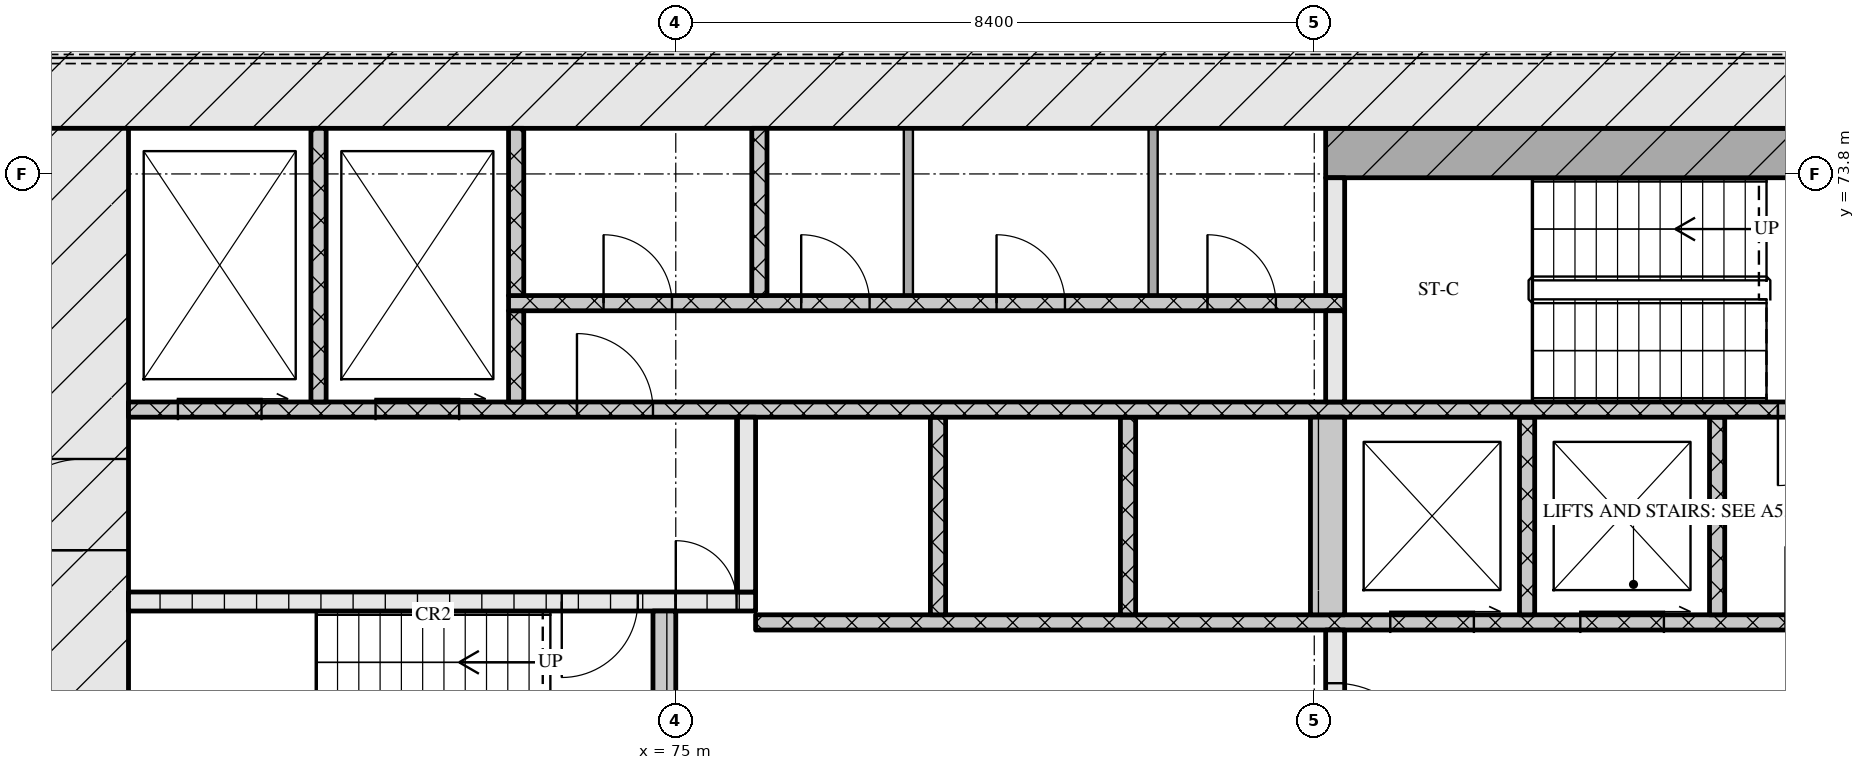
"""IFC4 building model, lengths in metres.
Left out: names, types, materials, properties, quantities, classifications, styles, units other than length and angle.
Written with IfcOpenShell. Run it as: python <this file> out.ifc"""

import sys

from ifc_helpers import new_model, si_unit, direction, frame, frame_2d, origin, place, context, subcontext, project, spatial, rectangle, extrude, element, fill, save


model = new_model("IFC4")
c1 = context("Model", 3, precision=1e-05, world=origin(), true_north=direction((0.0, 1.0)))
c2 = subcontext(c1, "Body", "Model", "MODEL_VIEW")
j1 = project(units=[si_unit("LENGTHUNIT", "METRE"), si_unit("PLANEANGLEUNIT", "RADIAN")], contexts=[c1])
p1 = place(None, origin())
s1 = spatial("IfcSite", under=j1, at=p1, CompositionType="ELEMENT")
p2 = place(p1, origin())
s2 = spatial("IfcBuilding", under=s1, at=p2, CompositionType="ELEMENT")
p3 = place(p2, frame((0.0, 0.0, 23.7)))
s3 = spatial("IfcBuildingStorey", under=s2, at=p3, CompositionType="ELEMENT", Elevation=23.7)
p4 = place(p3, frame((66.6, 75.0, 0.0), z_axis=(0.0, 0.0, 1.0), x_axis=(1.0, 0.0, 0.0)))
e1 = element("IfcWall", 1, at=p4, inside=s3, PredefinedType="SOLIDWALL", context=c2, shape_type="SweptSolid", body=[
    extrude(rectangle(XDim=42.0, YDim=1.2, at=frame_2d((21.0, 0.0))), origin(), (0.0, 0.0, 1.0), 4.2),
])
p5 = place(p3, frame((67.2, 62.4, 0.0), z_axis=(0.0, 0.0, 1.0), x_axis=(0.0, 1.0, 0.0)))
e2 = element("IfcWall", 2, at=p5, inside=s3, PredefinedType="SOLIDWALL", context=c2, shape_type="SweptSolid", body=[
    extrude(rectangle(XDim=12.0, YDim=1.2, at=frame_2d((6.0, 0.0))), origin(), (0.0, 0.0, 1.0), 4.2),
])
p6 = place(p5, frame((6.45, 0.0, 0.0)))
e3 = element("IfcOpeningElement", 3, at=p6, cuts=e2, PredefinedType="OPENING", context=c2, shape_type="SweptSolid", body=[
    extrude(rectangle(XDim=1.2, YDim=2.1, at=frame_2d((0.6, 1.05))), frame((0.0, 0.61, 0.0), z_axis=(0.0, -1.0, 0.0), x_axis=(1.0, 0.0, 0.0)), (0.0, 0.0, 1.0), 1.22),
])
p7 = place(p3, frame((74.85, 65.2, 0.0), z_axis=(0.0, 0.0, 1.0), x_axis=(0.0, 1.0, 0.0)))
e4 = element("IfcWall", 4, at=p7, inside=s3, PredefinedType="SOLIDWALL", context=c2, shape_type="SweptSolid", body=[
    extrude(rectangle(XDim=2.85, YDim=0.3, at=frame_2d((1.425, 0.0))), origin(), (0.0, 0.0, 1.0), 4.2),
])
p8 = place(p3, frame((83.675, 65.2, 0.0), z_axis=(0.0, 0.0, 1.0), x_axis=(0.0, 1.0, 0.0)))
e5 = element("IfcWall", 5, at=p8, inside=s3, PredefinedType="SOLIDWALL", context=c2, shape_type="SweptSolid", body=[
    extrude(rectangle(XDim=2.6, YDim=0.25, at=frame_2d((1.3, 0.0))), origin(), (0.0, 0.0, 1.0), 4.2),
])
p9 = place(p8, frame((0.7, 0.0, 0.0)))
e6 = element("IfcOpeningElement", 6, at=p9, cuts=e5, PredefinedType="OPENING", context=c2, shape_type="SweptSolid", body=[
    extrude(rectangle(XDim=1.2, YDim=2.1, at=frame_2d((0.6, 1.05))), frame((0.0, 0.135, 0.0), z_axis=(0.0, -1.0, 0.0), x_axis=(1.0, 0.0, 0.0)), (0.0, 0.0, 1.0), 0.27),
])
p10 = place(p3, frame((76.05, 67.9, 0.0), z_axis=(0.0, 0.0, 1.0), x_axis=(1.0, 0.0, 0.0)))
e7 = element("IfcWall", 7, at=p10, inside=s3, PredefinedType="SOLIDWALL", context=c2, shape_type="SweptSolid", body=[
    extrude(rectangle(XDim=23.1, YDim=0.2, at=frame_2d((11.55, 0.0))), origin(), (0.0, 0.0, 1.0), 4.2),
])
p11 = place(p10, frame((8.35, 0.0, 0.0)))
e8 = element("IfcOpeningElement", 8, at=p11, cuts=e7, PredefinedType="OPENING", context=c2, shape_type="SweptSolid", body=[
    extrude(rectangle(XDim=1.1, YDim=2.1, at=frame_2d((0.55, 1.05))), frame((0.0, 0.11, 0.0), z_axis=(0.0, -1.0, 0.0), x_axis=(1.0, 0.0, 0.0)), (0.0, 0.0, 1.0), 0.22),
])
p12 = place(p10, frame((10.85, 0.0, 0.0)))
e9 = element("IfcOpeningElement", 9, at=p12, cuts=e7, PredefinedType="OPENING", context=c2, shape_type="SweptSolid", body=[
    extrude(rectangle(XDim=1.1, YDim=2.1, at=frame_2d((0.55, 1.05))), frame((0.0, 0.11, 0.0), z_axis=(0.0, -1.0, 0.0), x_axis=(1.0, 0.0, 0.0)), (0.0, 0.0, 1.0), 0.22),
])
p13 = place(p10, frame((13.55, 0.0, 0.0)))
e10 = element("IfcOpeningElement", 10, at=p13, cuts=e7, PredefinedType="OPENING", context=c2, shape_type="SweptSolid", body=[
    extrude(rectangle(XDim=1.0, YDim=2.1, at=frame_2d((0.5, 1.05))), frame((0.0, 0.11, 0.0), z_axis=(0.0, -1.0, 0.0), x_axis=(1.0, 0.0, 0.0)), (0.0, 0.0, 1.0), 0.22),
])
for number, where, z_axis, x_axis in (
    (11, (78.45, 68.0, 0.0), (0.0, 0.0, 1.0), (0.0, 1.0, 0.0)),
    (12, (80.95, 68.0, 0.0), (0.0, 0.0, 1.0), (0.0, 1.0, 0.0)),
):
    element("IfcWall", number, at=place(p3, frame(where, z_axis=z_axis, x_axis=x_axis)), inside=s3, PredefinedType="SOLIDWALL", context=c2, shape_type="SweptSolid", body=[
        extrude(rectangle(XDim=2.6, YDim=0.2, at=frame_2d((1.3, 0.0))), origin(), (0.0, 0.0, 1.0), 4.2),
    ])
p14 = place(p3, frame((83.575, 68.0, 0.0), z_axis=(0.0, 0.0, 1.0), x_axis=(0.0, 1.0, 0.0)))
e13 = element("IfcWall", 13, at=p14, inside=s3, PredefinedType="SOLIDWALL", context=c2, shape_type="SweptSolid", body=[
    extrude(rectangle(XDim=2.6, YDim=0.45, at=frame_2d((1.3, 0.0))), origin(), (0.0, 0.0, 1.0), 4.2),
])
for number, where, z_axis, x_axis in (
    (14, (86.2, 68.0, 0.0), (0.0, 0.0, 1.0), (0.0, 1.0, 0.0)),
    (15, (88.7, 68.0, 0.0), (0.0, 0.0, 1.0), (0.0, 1.0, 0.0)),
):
    element("IfcWall", number, at=place(p3, frame(where, z_axis=z_axis, x_axis=x_axis)), inside=s3, PredefinedType="SOLIDWALL", context=c2, shape_type="SweptSolid", body=[
        extrude(rectangle(XDim=2.6, YDim=0.2, at=frame_2d((1.3, 0.0))), origin(), (0.0, 0.0, 1.0), 4.2),
    ])
p15 = place(p3, frame((67.8, 68.175, 0.0), z_axis=(0.0, 0.0, 1.0), x_axis=(1.0, 0.0, 0.0)))
e16 = element("IfcWall", 16, at=p15, inside=s3, PredefinedType="SOLIDWALL", context=c2, shape_type="SweptSolid", body=[
    extrude(rectangle(XDim=8.25, YDim=0.25, at=frame_2d((4.125, 0.0))), origin(), (0.0, 0.0, 1.0), 4.2),
])
p16 = place(p15, frame((5.7, 0.0, 0.0)))
e17 = element("IfcOpeningElement", 17, at=p16, cuts=e16, PredefinedType="OPENING", context=c2, shape_type="SweptSolid", body=[
    extrude(rectangle(XDim=1.0, YDim=2.1, at=frame_2d((0.5, 1.05))), frame((0.0, 0.135, 0.0), z_axis=(0.0, -1.0, 0.0), x_axis=(1.0, 0.0, 0.0)), (0.0, 0.0, 1.0), 0.27),
])
p17 = place(p15, frame((7.2, 0.0, 0.0)))
e18 = element("IfcOpeningElement", 18, at=p17, cuts=e16, PredefinedType="OPENING", context=c2, shape_type="SweptSolid", body=[
    extrude(rectangle(XDim=0.8, YDim=2.1, at=frame_2d((0.4, 1.05))), frame((0.0, 0.135, 0.0), z_axis=(0.0, -1.0, 0.0), x_axis=(1.0, 0.0, 0.0)), (0.0, 0.0, 1.0), 0.27),
])
p18 = place(p3, frame((75.925, 68.3, 0.0), z_axis=(0.0, 0.0, 1.0), x_axis=(0.0, 1.0, 0.0)))
e19 = element("IfcWall", 19, at=p18, inside=s3, PredefinedType="SOLIDWALL", context=c2, shape_type="SweptSolid", body=[
    extrude(rectangle(XDim=2.3, YDim=0.25, at=frame_2d((1.15, 0.0))), origin(), (0.0, 0.0, 1.0), 4.2),
])
p19 = place(p3, frame((67.8, 70.7, 0.0), z_axis=(0.0, 0.0, 1.0), x_axis=(1.0, 0.0, 0.0)))
e20 = element("IfcWall", 20, at=p19, inside=s3, PredefinedType="SOLIDWALL", context=c2, shape_type="SweptSolid", body=[
    extrude(rectangle(XDim=39.6, YDim=0.2, at=frame_2d((19.8, 0.0))), origin(), (0.0, 0.0, 1.0), 4.2),
])
p20 = place(p19, frame((0.65, 0.0, 0.0)))
e21 = element("IfcOpeningElement", 21, at=p20, cuts=e20, PredefinedType="OPENING", context=c2, shape_type="SweptSolid", body=[
    extrude(rectangle(XDim=1.1, YDim=2.1, at=frame_2d((0.55, 1.05))), frame((0.0, 0.11, 0.0), z_axis=(0.0, -1.0, 0.0), x_axis=(1.0, 0.0, 0.0)), (0.0, 0.0, 1.0), 0.22),
])
p21 = place(p19, frame((3.25, 0.0, 0.0)))
e22 = element("IfcOpeningElement", 22, at=p21, cuts=e20, PredefinedType="OPENING", context=c2, shape_type="SweptSolid", body=[
    extrude(rectangle(XDim=1.1, YDim=2.1, at=frame_2d((0.55, 1.05))), frame((0.0, 0.11, 0.0), z_axis=(0.0, -1.0, 0.0), x_axis=(1.0, 0.0, 0.0)), (0.0, 0.0, 1.0), 0.22),
])
p22 = place(p19, frame((5.9, 0.0, 0.0)))
e23 = element("IfcOpeningElement", 23, at=p22, cuts=e20, PredefinedType="OPENING", context=c2, shape_type="SweptSolid", body=[
    extrude(rectangle(XDim=1.0, YDim=2.1, at=frame_2d((0.5, 1.05))), frame((0.0, 0.11, 0.0), z_axis=(0.0, -1.0, 0.0), x_axis=(1.0, 0.0, 0.0)), (0.0, 0.0, 1.0), 0.22),
])
p23 = place(p19, frame((21.7, 0.0, 0.0)))
e24 = element("IfcOpeningElement", 24, at=p23, cuts=e20, PredefinedType="OPENING", context=c2, shape_type="SweptSolid", body=[
    extrude(rectangle(XDim=1.0, YDim=2.1, at=frame_2d((0.5, 1.05))), frame((0.0, 0.11, 0.0), z_axis=(0.0, -1.0, 0.0), x_axis=(1.0, 0.0, 0.0)), (0.0, 0.0, 1.0), 0.22),
])
p24 = place(p19, frame((32.7, 0.0, 0.0)))
e25 = element("IfcOpeningElement", 25, at=p24, cuts=e20, PredefinedType="OPENING", context=c2, shape_type="SweptSolid", body=[
    extrude(rectangle(XDim=1.0, YDim=2.1, at=frame_2d((0.5, 1.05))), frame((0.0, 0.11, 0.0), z_axis=(0.0, -1.0, 0.0), x_axis=(1.0, 0.0, 0.0)), (0.0, 0.0, 1.0), 0.22),
])
p25 = place(p19, frame((35.25, 0.0, 0.0)))
e26 = element("IfcOpeningElement", 26, at=p25, cuts=e20, PredefinedType="OPENING", context=c2, shape_type="SweptSolid", body=[
    extrude(rectangle(XDim=1.1, YDim=2.1, at=frame_2d((0.55, 1.05))), frame((0.0, 0.11, 0.0), z_axis=(0.0, -1.0, 0.0), x_axis=(1.0, 0.0, 0.0)), (0.0, 0.0, 1.0), 0.22),
])
p26 = place(p19, frame((37.85, 0.0, 0.0)))
e27 = element("IfcOpeningElement", 27, at=p26, cuts=e20, PredefinedType="OPENING", context=c2, shape_type="SweptSolid", body=[
    extrude(rectangle(XDim=1.1, YDim=2.1, at=frame_2d((0.55, 1.05))), frame((0.0, 0.11, 0.0), z_axis=(0.0, -1.0, 0.0), x_axis=(1.0, 0.0, 0.0)), (0.0, 0.0, 1.0), 0.22),
])
p27 = place(p3, frame((70.3, 70.8, 0.0), z_axis=(0.0, 0.0, 1.0), x_axis=(0.0, 1.0, 0.0)))
e28 = element("IfcWall", 28, at=p27, inside=s3, PredefinedType="SOLIDWALL", context=c2, shape_type="SweptSolid", body=[
    extrude(rectangle(XDim=3.6, YDim=0.2, at=frame_2d((1.8, 0.0))), origin(), (0.0, 0.0, 1.0), 4.2),
])
p28 = place(p3, frame((72.9, 70.8, 0.0), z_axis=(0.0, 0.0, 1.0), x_axis=(0.0, 1.0, 0.0)))
e29 = element("IfcWall", 29, at=p28, inside=s3, PredefinedType="SOLIDWALL", context=c2, shape_type="SweptSolid", body=[
    extrude(rectangle(XDim=1.2, YDim=0.2, at=frame_2d((0.6, 0.0))), origin(), (0.0, 0.0, 1.0), 4.2),
])
p29 = place(p3, frame((83.675, 70.8, 0.0), z_axis=(0.0, 0.0, 1.0), x_axis=(0.0, 1.0, 0.0)))
e30 = element("IfcWall", 30, at=p29, inside=s3, PredefinedType="SOLIDWALL", context=c2, shape_type="SweptSolid", body=[
    extrude(rectangle(XDim=1.2, YDim=0.25, at=frame_2d((0.6, 0.0))), origin(), (0.0, 0.0, 1.0), 4.2),
])
p30 = place(p3, frame((72.8, 72.1, 0.0), z_axis=(0.0, 0.0, 1.0), x_axis=(1.0, 0.0, 0.0)))
e31 = element("IfcWall", 31, at=p30, inside=s3, PredefinedType="SOLIDWALL", context=c2, shape_type="SweptSolid", body=[
    extrude(rectangle(XDim=11.0, YDim=0.2, at=frame_2d((5.5, 0.0))), origin(), (0.0, 0.0, 1.0), 4.2),
])
p31 = place(p30, frame((1.25, 0.0, 0.0)))
e32 = element("IfcOpeningElement", 32, at=p31, cuts=e31, PredefinedType="OPENING", context=c2, shape_type="SweptSolid", body=[
    extrude(rectangle(XDim=0.9, YDim=2.1, at=frame_2d((0.45, 1.05))), frame((0.0, 0.11, 0.0), z_axis=(0.0, -1.0, 0.0), x_axis=(1.0, 0.0, 0.0)), (0.0, 0.0, 1.0), 0.22),
])
p32 = place(p30, frame((3.85, 0.0, 0.0)))
e33 = element("IfcOpeningElement", 33, at=p32, cuts=e31, PredefinedType="OPENING", context=c2, shape_type="SweptSolid", body=[
    extrude(rectangle(XDim=0.9, YDim=2.1, at=frame_2d((0.45, 1.05))), frame((0.0, 0.11, 0.0), z_axis=(0.0, -1.0, 0.0), x_axis=(1.0, 0.0, 0.0)), (0.0, 0.0, 1.0), 0.22),
])
p33 = place(p30, frame((6.42, 0.0, 0.0)))
e34 = element("IfcOpeningElement", 34, at=p33, cuts=e31, PredefinedType="OPENING", context=c2, shape_type="SweptSolid", body=[
    extrude(rectangle(XDim=0.9, YDim=2.1, at=frame_2d((0.45, 1.05))), frame((0.0, 0.11, 0.0), z_axis=(0.0, -1.0, 0.0), x_axis=(1.0, 0.0, 0.0)), (0.0, 0.0, 1.0), 0.22),
])
p34 = place(p30, frame((9.195, 0.0, 0.0)))
e35 = element("IfcOpeningElement", 35, at=p34, cuts=e31, PredefinedType="OPENING", context=c2, shape_type="SweptSolid", body=[
    extrude(rectangle(XDim=0.9, YDim=2.1, at=frame_2d((0.45, 1.05))), frame((0.0, 0.11, 0.0), z_axis=(0.0, -1.0, 0.0), x_axis=(1.0, 0.0, 0.0)), (0.0, 0.0, 1.0), 0.22),
])
for number, where, z_axis, x_axis in (
    (36, (72.9, 72.2, 0.0), (0.0, 0.0, 1.0), (0.0, 1.0, 0.0)),
    (37, (76.1, 72.2, 0.0), (0.0, 0.0, 1.0), (0.0, 1.0, 0.0)),
):
    element("IfcWall", number, at=place(p3, frame(where, z_axis=z_axis, x_axis=x_axis)), inside=s3, PredefinedType="SOLIDWALL", context=c2, shape_type="SweptSolid", body=[
        extrude(rectangle(XDim=2.2, YDim=0.2, at=frame_2d((1.1, 0.0))), origin(), (0.0, 0.0, 1.0), 4.2),
    ])
for number, where, z_axis, x_axis in (
    (38, (78.06, 72.2, 0.0), (0.0, 0.0, 1.0), (0.0, 1.0, 0.0)),
    (39, (81.28, 72.2, 0.0), (0.0, 0.0, 1.0), (0.0, 1.0, 0.0)),
):
    element("IfcWall", number, at=place(p3, frame(where, z_axis=z_axis, x_axis=x_axis)), inside=s3, PredefinedType="PARTITIONING", context=c2, shape_type="SweptSolid", body=[
        extrude(rectangle(XDim=2.2, YDim=0.12, at=frame_2d((1.1, 0.0))), origin(), (0.0, 0.0, 1.0), 4.2),
    ])
p35 = place(p3, frame((83.675, 72.2, 0.0), z_axis=(0.0, 0.0, 1.0), x_axis=(0.0, 1.0, 0.0)))
e40 = element("IfcWall", 40, at=p35, inside=s3, PredefinedType="SOLIDWALL", context=c2, shape_type="SweptSolid", body=[
    extrude(rectangle(XDim=1.55, YDim=0.25, at=frame_2d((0.775, 0.0))), origin(), (0.0, 0.0, 1.0), 4.2),
])
p36 = place(p3, frame((83.55, 74.075, 0.0), z_axis=(0.0, 0.0, 1.0), x_axis=(1.0, 0.0, 0.0)))
e41 = element("IfcWall", 41, at=p36, inside=s3, PredefinedType="SOLIDWALL", context=c2, shape_type="SweptSolid", body=[
    extrude(rectangle(XDim=8.1, YDim=0.65, at=frame_2d((4.05, 0.0))), origin(), (0.0, 0.0, 1.0), 4.2),
])
p37 = place(p9, origin())
e42 = element("IfcDoor", 42, at=p37, inside=s3, OperationType="SINGLE_SWING_RIGHT", PredefinedType="DOOR", context=c2, shape_type="SweptSolid", body=[
    extrude(rectangle(XDim=1.2, YDim=2.1, at=frame_2d((0.6, 1.05))), frame((0.0, 0.025, 0.0), z_axis=(0.0, -1.0, 0.0), x_axis=(1.0, 0.0, 0.0)), (0.0, 0.0, 1.0), 0.05),
])
fill(e6, e42)
p38 = place(p11, origin())
e43 = element("IfcDoor", 43, at=p38, inside=s3, OperationType="SLIDING_TO_RIGHT", PredefinedType="DOOR", context=c2, shape_type="SweptSolid", body=[
    extrude(rectangle(XDim=1.1, YDim=2.1, at=frame_2d((0.55, 1.05))), frame((0.0, 0.025, 0.0), z_axis=(0.0, -1.0, 0.0), x_axis=(1.0, 0.0, 0.0)), (0.0, 0.0, 1.0), 0.05),
])
fill(e8, e43)
p39 = place(p12, origin())
e44 = element("IfcDoor", 44, at=p39, inside=s3, OperationType="SLIDING_TO_RIGHT", PredefinedType="DOOR", context=c2, shape_type="SweptSolid", body=[
    extrude(rectangle(XDim=1.1, YDim=2.1, at=frame_2d((0.55, 1.05))), frame((0.0, 0.025, 0.0), z_axis=(0.0, -1.0, 0.0), x_axis=(1.0, 0.0, 0.0)), (0.0, 0.0, 1.0), 0.05),
])
fill(e9, e44)
p40 = place(p16, origin())
e45 = element("IfcDoor", 45, at=p40, inside=s3, OperationType="SINGLE_SWING_RIGHT", PredefinedType="DOOR", context=c2, shape_type="SweptSolid", body=[
    extrude(rectangle(XDim=1.0, YDim=2.1, at=frame_2d((0.5, 1.05))), frame((0.0, 0.025, 0.0), z_axis=(0.0, -1.0, 0.0), x_axis=(1.0, 0.0, 0.0)), (0.0, 0.0, 1.0), 0.05),
])
fill(e17, e45)
p41 = place(p17, origin())
e46 = element("IfcDoor", 46, at=p41, inside=s3, OperationType="SINGLE_SWING_LEFT", PredefinedType="DOOR", context=c2, shape_type="SweptSolid", body=[
    extrude(rectangle(XDim=0.8, YDim=2.1, at=frame_2d((0.4, 1.05))), frame((0.0, 0.025, 0.0), z_axis=(0.0, -1.0, 0.0), x_axis=(1.0, 0.0, 0.0)), (0.0, 0.0, 1.0), 0.05),
])
fill(e18, e46)
p42 = place(p6, origin())
e47 = element("IfcDoor", 47, at=p42, inside=s3, OperationType="SINGLE_SWING_LEFT", PredefinedType="DOOR", context=c2, shape_type="SweptSolid", body=[
    extrude(rectangle(XDim=1.2, YDim=2.1, at=frame_2d((0.6, 1.05))), frame((0.0, 0.025, 0.0), z_axis=(0.0, -1.0, 0.0), x_axis=(1.0, 0.0, 0.0)), (0.0, 0.0, 1.0), 0.05),
])
fill(e3, e47)
p43 = place(p20, origin())
e48 = element("IfcDoor", 48, at=p43, inside=s3, OperationType="SLIDING_TO_RIGHT", PredefinedType="DOOR", context=c2, shape_type="SweptSolid", body=[
    extrude(rectangle(XDim=1.1, YDim=2.1, at=frame_2d((0.55, 1.05))), frame((0.0, 0.025, 0.0), z_axis=(0.0, -1.0, 0.0), x_axis=(1.0, 0.0, 0.0)), (0.0, 0.0, 1.0), 0.05),
])
fill(e21, e48)
p44 = place(p21, origin())
e49 = element("IfcDoor", 49, at=p44, inside=s3, OperationType="SLIDING_TO_RIGHT", PredefinedType="DOOR", context=c2, shape_type="SweptSolid", body=[
    extrude(rectangle(XDim=1.1, YDim=2.1, at=frame_2d((0.55, 1.05))), frame((0.0, 0.025, 0.0), z_axis=(0.0, -1.0, 0.0), x_axis=(1.0, 0.0, 0.0)), (0.0, 0.0, 1.0), 0.05),
])
fill(e22, e49)
p45 = place(p22, origin())
e50 = element("IfcDoor", 50, at=p45, inside=s3, OperationType="SINGLE_SWING_LEFT", PredefinedType="DOOR", context=c2, shape_type="SweptSolid", body=[
    extrude(rectangle(XDim=1.0, YDim=2.1, at=frame_2d((0.5, 1.05))), frame((0.0, 0.025, 0.0), z_axis=(0.0, -1.0, 0.0), x_axis=(1.0, 0.0, 0.0)), (0.0, 0.0, 1.0), 0.05),
])
fill(e23, e50)
p46 = place(p23, origin())
e51 = element("IfcDoor", 51, at=p46, inside=s3, OperationType="SINGLE_SWING_RIGHT", PredefinedType="DOOR", context=c2, shape_type="SweptSolid", body=[
    extrude(rectangle(XDim=1.0, YDim=2.1, at=frame_2d((0.5, 1.05))), frame((0.0, 0.025, 0.0), z_axis=(0.0, -1.0, 0.0), x_axis=(1.0, 0.0, 0.0)), (0.0, 0.0, 1.0), 0.05),
])
fill(e24, e51)
p47 = place(p31, origin())
e52 = element("IfcDoor", 52, at=p47, inside=s3, OperationType="SINGLE_SWING_LEFT", PredefinedType="DOOR", context=c2, shape_type="SweptSolid", body=[
    extrude(rectangle(XDim=0.9, YDim=2.1, at=frame_2d((0.45, 1.05))), frame((0.0, 0.025, 0.0), z_axis=(0.0, -1.0, 0.0), x_axis=(1.0, 0.0, 0.0)), (0.0, 0.0, 1.0), 0.05),
])
fill(e32, e52)
p48 = place(p32, origin())
e53 = element("IfcDoor", 53, at=p48, inside=s3, OperationType="SINGLE_SWING_LEFT", PredefinedType="DOOR", context=c2, shape_type="SweptSolid", body=[
    extrude(rectangle(XDim=0.9, YDim=2.1, at=frame_2d((0.45, 1.05))), frame((0.0, 0.025, 0.0), z_axis=(0.0, -1.0, 0.0), x_axis=(1.0, 0.0, 0.0)), (0.0, 0.0, 1.0), 0.05),
])
fill(e33, e53)
p49 = place(p33, origin())
e54 = element("IfcDoor", 54, at=p49, inside=s3, OperationType="SINGLE_SWING_LEFT", PredefinedType="DOOR", context=c2, shape_type="SweptSolid", body=[
    extrude(rectangle(XDim=0.9, YDim=2.1, at=frame_2d((0.45, 1.05))), frame((0.0, 0.025, 0.0), z_axis=(0.0, -1.0, 0.0), x_axis=(1.0, 0.0, 0.0)), (0.0, 0.0, 1.0), 0.05),
])
fill(e34, e54)
p50 = place(p34, origin())
e55 = element("IfcDoor", 55, at=p50, inside=s3, OperationType="SINGLE_SWING_LEFT", PredefinedType="DOOR", context=c2, shape_type="SweptSolid", body=[
    extrude(rectangle(XDim=0.9, YDim=2.1, at=frame_2d((0.45, 1.05))), frame((0.0, 0.025, 0.0), z_axis=(0.0, -1.0, 0.0), x_axis=(1.0, 0.0, 0.0)), (0.0, 0.0, 1.0), 0.05),
])
fill(e35, e55)
save(model, sys.argv[1])
